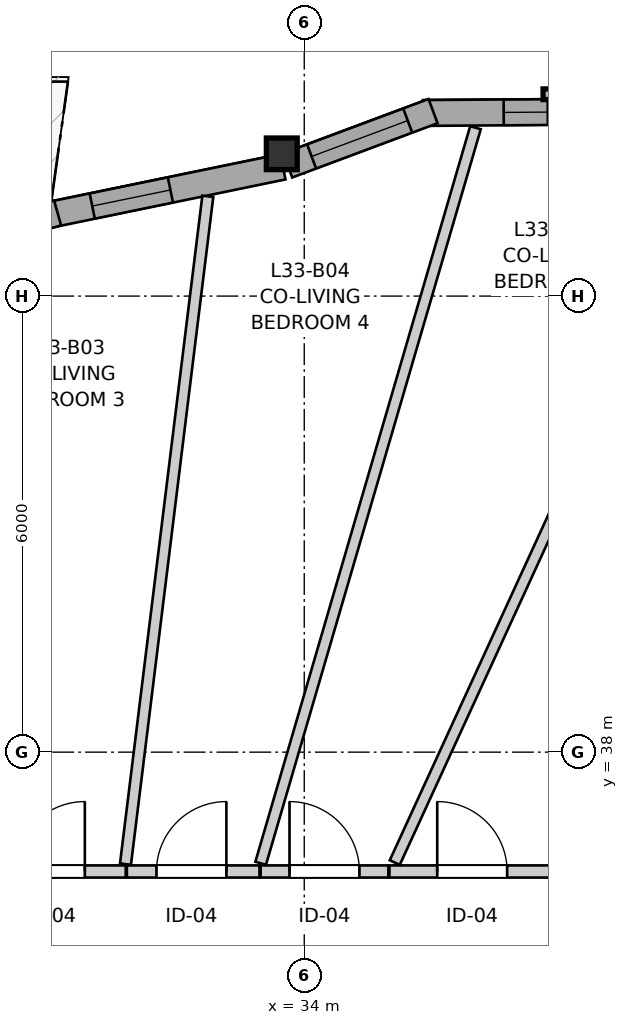
"""IFC4 building model, lengths in metres.
Left out: names, types, materials, properties, quantities, classifications, styles, units other than length and angle.
Written with IfcOpenShell. Run it as: python <this file> out.ifc"""

import sys

from ifc_helpers import new_model, si_unit, direction, frame, frame_2d, origin, origin_2d, place, context, subcontext, project, spatial, rectangle, i_section, extrude, source, transform, mapped, element, fill, save


model = new_model("IFC4")
c1 = context("Model", 3, precision=1e-05, world=origin(), true_north=direction((0.0, 1.0)))
c2 = subcontext(c1, "Body", "Model", "MODEL_VIEW")
j1 = project(units=[si_unit("LENGTHUNIT", "METRE"), si_unit("PLANEANGLEUNIT", "RADIAN")], contexts=[c1])
p1 = place(None, origin())
s1 = spatial("IfcSite", under=j1, at=p1, CompositionType="ELEMENT")
p2 = place(p1, origin())
s2 = spatial("IfcBuilding", under=s1, at=p2, CompositionType="ELEMENT")
p3 = place(p2, frame((0.0, 0.0, 112.0)))
s3 = spatial("IfcBuildingStorey", under=s2, at=p3, CompositionType="ELEMENT", Elevation=112.0)
m1 = source(origin(), c2, "Body", "SweptSolid", [
    extrude(i_section(OverallWidth=0.406, OverallDepth=0.416, WebThickness=0.027, FlangeThickness=0.044, FilletRadius=0.015, at=origin_2d()), origin(), (0.0, 0.0, 1.0), 2.935),
])
p4 = place(p3, frame((33.704, 45.872, 0.0), z_axis=(0.0, 0.0, 1.0), x_axis=(1.0, 0.0, 0.0)))
e1 = element("IfcColumn", 1, at=p4, inside=s3, PredefinedType="PILASTER", context=c2, shape_type="MappedRepresentation", body=[
    mapped(m1, transform((0.0, 0.0, 0.0), x_axis=(1.0, 0.0, 0.0), y_axis=(0.0, 1.0, 0.0), z_axis=(0.0, 0.0, 1.0), scale=1.0)),
])
p5 = place(p3, frame((37.662, 46.424, 0.0), z_axis=(0.0, 0.0, 1.0), x_axis=(-0.999976456891, -0.00686189939, 0.0)))
e2 = element("IfcWall", 2, at=p5, inside=s3, PredefinedType="SOLIDWALL", context=c2, shape_type="SweptSolid", body=[
    extrude(rectangle(XDim=2.099, YDim=0.34, at=frame_2d((1.05, 0.0))), origin(), (0.0, 0.0, 1.0), 2.465),
])
p6 = place(p5, frame((0.458, 0.0, 0.82)))
e3 = element("IfcOpeningElement", 3, at=p6, cuts=e2, PredefinedType="OPENING", context=c2, shape_type="SweptSolid", body=[
    extrude(rectangle(XDim=0.58, YDim=1.35, at=frame_2d((0.29, 0.675))), frame((0.0, 0.18, 0.0), z_axis=(0.0, -1.0, 0.0), x_axis=(1.0, 0.0, 0.0)), (0.0, 0.0, 1.0), 0.36),
])
p7 = place(p3, frame((35.695, 46.434, 0.0), z_axis=(0.0, 0.0, 1.0), x_axis=(-0.9368002254, -0.349864741994, 0.0)))
e4 = element("IfcWall", 4, at=p7, inside=s3, PredefinedType="SOLIDWALL", context=c2, shape_type="SweptSolid", body=[
    extrude(rectangle(XDim=2.041, YDim=0.34, at=frame_2d((1.021, 0.0))), origin(), (0.0, 0.0, 1.0), 2.465),
])
p8 = place(p7, frame((0.355, 0.0, 0.82)))
e5 = element("IfcOpeningElement", 5, at=p8, cuts=e4, PredefinedType="OPENING", context=c2, shape_type="SweptSolid", body=[
    extrude(rectangle(XDim=1.35, YDim=1.45, at=frame_2d((0.675, 0.725))), frame((0.0, 0.18, 0.0), z_axis=(0.0, -1.0, 0.0), x_axis=(1.0, 0.0, 0.0)), (0.0, 0.0, 1.0), 0.36),
])
p9 = place(p3, frame((33.719, 45.701, 0.0), z_axis=(0.0, 0.0, 1.0), x_axis=(-0.979417849231, -0.201843198072, 0.0)))
e6 = element("IfcWall", 6, at=p9, inside=s3, PredefinedType="SOLIDWALL", context=c2, shape_type="SweptSolid", body=[
    extrude(rectangle(XDim=3.113, YDim=0.34, at=frame_2d((1.557, 0.0))), origin(), (0.0, 0.0, 1.0), 2.465),
])
p10 = place(p9, frame((1.511, 0.0, 0.82)))
e7 = element("IfcOpeningElement", 7, at=p10, cuts=e6, PredefinedType="OPENING", context=c2, shape_type="SweptSolid", body=[
    extrude(rectangle(XDim=1.05, YDim=1.45, at=frame_2d((0.525, 0.725))), frame((0.0, 0.18, 0.0), z_axis=(0.0, -1.0, 0.0), x_axis=(1.0, 0.0, 0.0)), (0.0, 0.0, 1.0), 0.36),
])
p11 = place(p3, frame((30.755, 45.094, 0.0), z_axis=(0.0, 0.0, 1.0), x_axis=(-0.963040794714, -0.269355578589, 0.0)))
e8 = element("IfcWall", 8, at=p11, inside=s3, PredefinedType="SOLIDWALL", context=c2, shape_type="SweptSolid", body=[
    extrude(rectangle(XDim=2.839, YDim=0.34, at=frame_2d((1.419, 0.0))), origin(), (0.0, 0.0, 1.0), 2.465),
])
p12 = place(p11, frame((0.373, 0.0, 0.82)))
e9 = element("IfcOpeningElement", 9, at=p12, cuts=e8, PredefinedType="OPENING", context=c2, shape_type="SweptSolid", body=[
    extrude(rectangle(XDim=1.05, YDim=1.45, at=frame_2d((0.525, 0.725))), frame((0.0, 0.18, 0.0), z_axis=(0.0, -1.0, 0.0), x_axis=(1.0, 0.0, 0.0)), (0.0, 0.0, 1.0), 0.36),
])
p13 = place(p11, frame((1.792, 0.0, 0.82)))
e10 = element("IfcOpeningElement", 10, at=p13, cuts=e8, PredefinedType="OPENING", context=c2, shape_type="SweptSolid", body=[
    extrude(rectangle(XDim=0.58, YDim=1.35, at=frame_2d((0.29, 0.675))), frame((0.0, 0.18, 0.0), z_axis=(0.0, -1.0, 0.0), x_axis=(1.0, 0.0, 0.0)), (0.0, 0.0, 1.0), 0.36),
])
p14 = place(p3, frame((35.121, 36.43, 0.0), z_axis=(0.0, 0.0, 1.0), x_axis=(1.0, 0.0, 0.0)))
e11 = element("IfcWall", 11, at=p14, inside=s3, PredefinedType="PARTITIONING", context=c2, shape_type="SweptSolid", body=[
    extrude(rectangle(XDim=2.179, YDim=0.16, at=frame_2d((1.089, 0.0))), origin(), (0.0, 0.0, 1.0), 2.573),
])
p15 = place(p14, frame((0.628, 0.0, 0.0)))
e12 = element("IfcOpeningElement", 12, at=p15, cuts=e11, PredefinedType="OPENING", context=c2, shape_type="SweptSolid", body=[
    extrude(rectangle(XDim=0.92, YDim=2.1, at=frame_2d((0.46, 1.05))), frame((0.0, 0.09, 0.0), z_axis=(0.0, -1.0, 0.0), x_axis=(1.0, 0.0, 0.0)), (0.0, 0.0, 1.0), 0.18),
])
p16 = place(p3, frame((29.7, 36.43, 0.0), z_axis=(0.0, 0.0, 1.0), x_axis=(1.0, 0.0, 0.0)))
e13 = element("IfcWall", 13, at=p16, inside=s3, PredefinedType="PARTITIONING", context=c2, shape_type="SweptSolid", body=[
    extrude(rectangle(XDim=1.951, YDim=0.16, at=frame_2d((0.976, 0.0))), origin(), (0.0, 0.0, 1.0), 2.935),
])
p17 = place(p16, frame((0.493, 0.0, 0.0)))
e14 = element("IfcOpeningElement", 14, at=p17, cuts=e13, PredefinedType="OPENING", context=c2, shape_type="SweptSolid", body=[
    extrude(rectangle(XDim=0.92, YDim=2.1, at=frame_2d((0.46, 1.05))), frame((0.0, 0.09, 0.0), z_axis=(0.0, -1.0, 0.0), x_axis=(1.0, 0.0, 0.0)), (0.0, 0.0, 1.0), 0.18),
])
p18 = place(p3, frame((31.666, 36.43, 0.0), z_axis=(0.0, 0.0, 1.0), x_axis=(1.0, 0.0, 0.0)))
e15 = element("IfcWall", 15, at=p18, inside=s3, PredefinedType="PARTITIONING", context=c2, shape_type="SweptSolid", body=[
    extrude(rectangle(XDim=1.745, YDim=0.16, at=frame_2d((0.873, 0.0))), origin(), (0.0, 0.0, 1.0), 2.935),
])
p19 = place(p18, frame((0.389, 0.0, 0.0)))
e16 = element("IfcOpeningElement", 16, at=p19, cuts=e15, PredefinedType="OPENING", context=c2, shape_type="SweptSolid", body=[
    extrude(rectangle(XDim=0.92, YDim=2.1, at=frame_2d((0.46, 1.05))), frame((0.0, 0.09, 0.0), z_axis=(0.0, -1.0, 0.0), x_axis=(1.0, 0.0, 0.0)), (0.0, 0.0, 1.0), 0.18),
])
p20 = place(p3, frame((33.426, 36.43, 0.0), z_axis=(0.0, 0.0, 1.0), x_axis=(1.0, 0.0, 0.0)))
e17 = element("IfcWall", 17, at=p20, inside=s3, PredefinedType="PARTITIONING", context=c2, shape_type="SweptSolid", body=[
    extrude(rectangle(XDim=1.68, YDim=0.16, at=frame_2d((0.84, 0.0))), origin(), (0.0, 0.0, 1.0), 2.935),
])
p21 = place(p20, frame((0.38, 0.0, 0.0)))
e18 = element("IfcOpeningElement", 18, at=p21, cuts=e17, PredefinedType="OPENING", context=c2, shape_type="SweptSolid", body=[
    extrude(rectangle(XDim=0.92, YDim=2.1, at=frame_2d((0.46, 1.05))), frame((0.0, 0.09, 0.0), z_axis=(0.0, -1.0, 0.0), x_axis=(1.0, 0.0, 0.0)), (0.0, 0.0, 1.0), 0.18),
])
p22 = place(p3, frame((33.427, 36.538, 0.0), z_axis=(0.0, 0.0, 1.0), x_axis=(0.280326379037, 0.959904745908, 0.0)))
e19 = element("IfcWall", 19, at=p22, inside=s3, PredefinedType="PARTITIONING", context=c2, shape_type="SweptSolid", body=[
    extrude(rectangle(XDim=10.082, YDim=0.145, at=frame_2d((5.041, 0.0))), origin(), (0.0, 0.0, 1.0), 2.935),
])
p23 = place(p3, frame((35.191, 36.548, 0.0), z_axis=(0.0, 0.0, 1.0), x_axis=(0.417154036681, 0.908835799075, 0.0)))
e20 = element("IfcWall", 20, at=p23, inside=s3, PredefinedType="PARTITIONING", context=c2, shape_type="SweptSolid", body=[
    extrude(rectangle(XDim=9.949, YDim=0.145, at=frame_2d((4.974, 0.0))), origin(), (0.0, 0.0, 1.0), 2.935),
])
p24 = place(p3, frame((31.648, 36.527, 0.0), z_axis=(0.0, 0.0, 1.0), x_axis=(0.122371290087, 0.992484391496, 0.0)))
e21 = element("IfcWall", 21, at=p24, inside=s3, PredefinedType="PARTITIONING", context=c2, shape_type="SweptSolid", body=[
    extrude(rectangle(XDim=8.852, YDim=0.145, at=frame_2d((4.426, 0.0))), origin(), (0.0, 0.0, 1.0), 2.935),
])
m2 = source(origin(), c2, "Body", "SweptSolid", [
    extrude(rectangle(XDim=0.58, YDim=1.35, at=frame_2d((0.29, 0.675))), frame((0.0, 0.03, 0.0), z_axis=(0.0, -1.0, 0.0), x_axis=(1.0, 0.0, 0.0)), (0.0, 0.0, 1.0), 0.06),
])
p25 = place(p6, origin())
e22 = element("IfcWindow", 22, at=p25, inside=s3, PartitioningType="SINGLE_PANEL", PredefinedType="WINDOW", context=c2, shape_type="MappedRepresentation", body=[
    mapped(m2, transform((0.0, 0.0, 0.0), x_axis=(1.0, 0.0, 0.0), y_axis=(0.0, 1.0, 0.0), z_axis=(0.0, 0.0, 1.0), scale=1.0)),
])
fill(e3, e22)
m3 = source(origin(), c2, "Body", "SweptSolid", [
    extrude(rectangle(XDim=1.35, YDim=1.45, at=frame_2d((0.675, 0.725))), frame((0.0, 0.03, 0.0), z_axis=(0.0, -1.0, 0.0), x_axis=(1.0, 0.0, 0.0)), (0.0, 0.0, 1.0), 0.06),
])
p26 = place(p8, origin())
e23 = element("IfcWindow", 23, at=p26, inside=s3, PartitioningType="SINGLE_PANEL", PredefinedType="WINDOW", context=c2, shape_type="MappedRepresentation", body=[
    mapped(m3, transform((0.0, 0.0, 0.0), x_axis=(1.0, 0.0, 0.0), y_axis=(0.0, 1.0, 0.0), z_axis=(0.0, 0.0, 1.0), scale=1.0)),
])
fill(e5, e23)
m4 = source(origin(), c2, "Body", "SweptSolid", [
    extrude(rectangle(XDim=1.05, YDim=1.45, at=frame_2d((0.525, 0.725))), frame((0.0, 0.03, 0.0), z_axis=(0.0, -1.0, 0.0), x_axis=(1.0, 0.0, 0.0)), (0.0, 0.0, 1.0), 0.06),
])
p27 = place(p10, origin())
e24 = element("IfcWindow", 24, at=p27, inside=s3, PartitioningType="SINGLE_PANEL", PredefinedType="WINDOW", context=c2, shape_type="MappedRepresentation", body=[
    mapped(m4, transform((0.0, 0.0, 0.0), x_axis=(1.0, 0.0, 0.0), y_axis=(0.0, 1.0, 0.0), z_axis=(0.0, 0.0, 1.0), scale=1.0)),
])
fill(e7, e24)
m5 = source(origin(), c2, "Body", "SweptSolid", [
    extrude(rectangle(XDim=0.92, YDim=2.1, at=frame_2d((0.46, 1.05))), frame((0.0, 0.025, 0.0), z_axis=(0.0, -1.0, 0.0), x_axis=(1.0, 0.0, 0.0)), (0.0, 0.0, 1.0), 0.05),
])
p28 = place(p15, origin())
e25 = element("IfcDoor", 25, at=p28, inside=s3, OperationType="SINGLE_SWING_LEFT", PredefinedType="DOOR", context=c2, shape_type="MappedRepresentation", body=[
    mapped(m5, transform((0.0, 0.0, 0.0), x_axis=(1.0, 0.0, 0.0), y_axis=(0.0, 1.0, 0.0), z_axis=(0.0, 0.0, 1.0), scale=1.0)),
])
fill(e12, e25)
p29 = place(p17, origin())
e26 = element("IfcDoor", 26, at=p29, inside=s3, OperationType="SINGLE_SWING_RIGHT", PredefinedType="DOOR", context=c2, shape_type="MappedRepresentation", body=[
    mapped(m5, transform((0.0, 0.0, 0.0), x_axis=(1.0, 0.0, 0.0), y_axis=(0.0, 1.0, 0.0), z_axis=(0.0, 0.0, 1.0), scale=1.0)),
])
fill(e14, e26)
p30 = place(p19, origin())
e27 = element("IfcDoor", 27, at=p30, inside=s3, OperationType="SINGLE_SWING_RIGHT", PredefinedType="DOOR", context=c2, shape_type="MappedRepresentation", body=[
    mapped(m5, transform((0.0, 0.0, 0.0), x_axis=(1.0, 0.0, 0.0), y_axis=(0.0, 1.0, 0.0), z_axis=(0.0, 0.0, 1.0), scale=1.0)),
])
fill(e16, e27)
p31 = place(p21, origin())
e28 = element("IfcDoor", 28, at=p31, inside=s3, OperationType="SINGLE_SWING_LEFT", PredefinedType="DOOR", context=c2, shape_type="MappedRepresentation", body=[
    mapped(m5, transform((0.0, 0.0, 0.0), x_axis=(1.0, 0.0, 0.0), y_axis=(0.0, 1.0, 0.0), z_axis=(0.0, 0.0, 1.0), scale=1.0)),
])
fill(e18, e28)
save(model, sys.argv[1])
